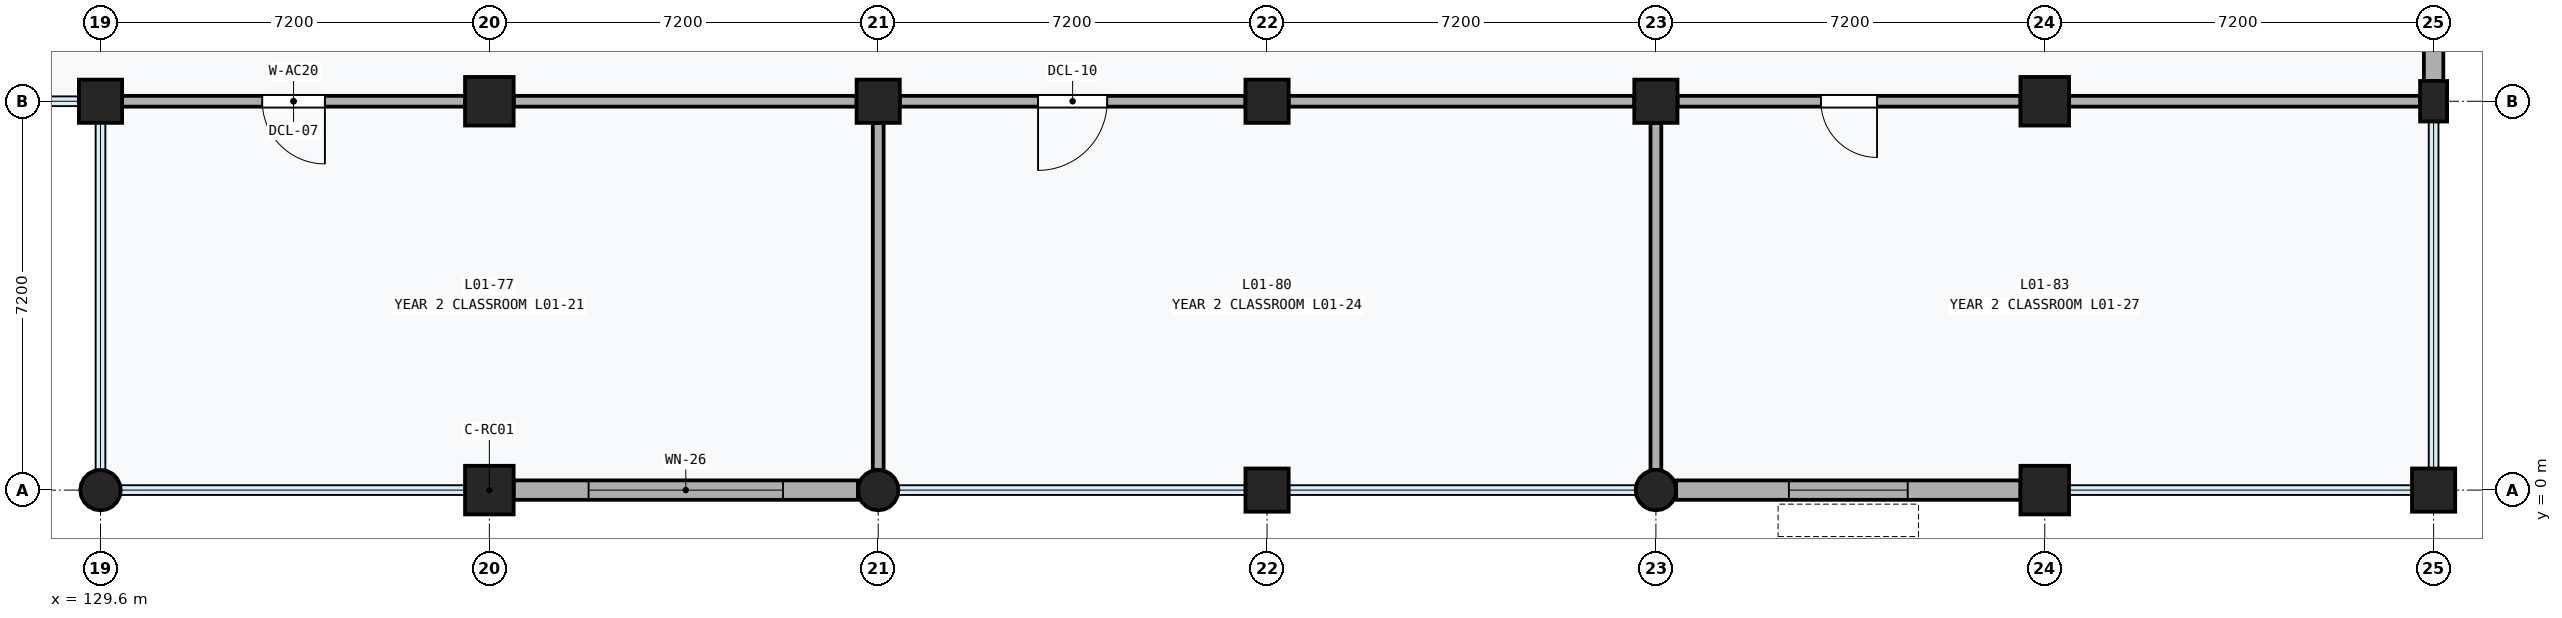
"""IFC4 building model, lengths in metres.
Left out: names, types, materials, properties, quantities, classifications, styles, units other than length and angle.
Written with IfcOpenShell. Run it as: python <this file> out.ifc"""

import sys

from ifc_helpers import new_model, si_unit, direction, frame, frame_2d, origin, origin_2d, place, context, subcontext, project, spatial, rectangle, circle, extrude, element, fill, save


model = new_model("IFC4")
c1 = context("Model", 3, precision=1e-05, world=origin(), true_north=direction((0.0, 1.0)))
c2 = subcontext(c1, "Body", "Model", "MODEL_VIEW")
j1 = project(units=[si_unit("LENGTHUNIT", "METRE"), si_unit("PLANEANGLEUNIT", "RADIAN")], contexts=[c1])
p1 = place(None, origin())
s1 = spatial("IfcSite", under=j1, at=p1, CompositionType="ELEMENT")
p2 = place(p1, origin())
s2 = spatial("IfcBuilding", under=s1, at=p2, CompositionType="ELEMENT")
p3 = place(p2, frame((0.0, 0.0, 4.8)))
s3 = spatial("IfcBuildingStorey", under=s2, at=p3, CompositionType="ELEMENT", Elevation=4.8)
p4 = place(p3, frame((129.6, 0.0, 0.0), z_axis=(0.0, 0.0, 1.0), x_axis=(1.0, 0.0, 0.0)))
e1 = element("IfcColumn", 1, at=p4, inside=s3, PredefinedType="COLUMN", context=c2, shape_type="SweptSolid", body=[
    extrude(circle(Radius=0.375, at=origin_2d()), origin(), (0.0, 0.0, 1.0), 4.8),
])
p5 = place(p3, frame((129.6, 7.2, 0.0), z_axis=(0.0, 0.0, 1.0), x_axis=(1.0, 0.0, 0.0)))
e2 = element("IfcColumn", 2, at=p5, inside=s3, PredefinedType="COLUMN", context=c2, shape_type="SweptSolid", body=[
    extrude(rectangle(XDim=0.8, YDim=0.8, at=origin_2d()), origin(), (0.0, 0.0, 1.0), 4.8),
])
for number, where, z_axis, x_axis in (
    (3, (136.8, 0.0, 0.0), (0.0, 0.0, 1.0), (1.0, 0.0, 0.0)),
    (4, (136.8, 7.2, 0.0), (0.0, 0.0, 1.0), (1.0, 0.0, 0.0)),
):
    element("IfcColumn", number, at=place(p3, frame(where, z_axis=z_axis, x_axis=x_axis)), inside=s3, PredefinedType="COLUMN", context=c2, shape_type="SweptSolid", body=[
        extrude(rectangle(XDim=0.9, YDim=0.9, at=origin_2d()), origin(), (0.0, 0.0, 1.0), 4.8),
    ])
p6 = place(p3, frame((144.0, 0.0, 0.0), z_axis=(0.0, 0.0, 1.0), x_axis=(1.0, 0.0, 0.0)))
e5 = element("IfcColumn", 5, at=p6, inside=s3, PredefinedType="COLUMN", context=c2, shape_type="SweptSolid", body=[
    extrude(circle(Radius=0.375, at=origin_2d()), origin(), (0.0, 0.0, 1.0), 4.8),
])
for number, where, z_axis, x_axis in (
    (6, (144.0, 7.2, 0.0), (0.0, 0.0, 1.0), (1.0, 0.0, 0.0)),
    (7, (151.2, 0.0, 0.0), (0.0, 0.0, 1.0), (1.0, 0.0, 0.0)),
    (8, (151.2, 7.2, 0.0), (0.0, 0.0, 1.0), (1.0, 0.0, 0.0)),
):
    element("IfcColumn", number, at=place(p3, frame(where, z_axis=z_axis, x_axis=x_axis)), inside=s3, PredefinedType="COLUMN", context=c2, shape_type="SweptSolid", body=[
        extrude(rectangle(XDim=0.8, YDim=0.8, at=origin_2d()), origin(), (0.0, 0.0, 1.0), 4.8),
    ])
p7 = place(p3, frame((158.4, 0.0, 0.0), z_axis=(0.0, 0.0, 1.0), x_axis=(1.0, 0.0, 0.0)))
e9 = element("IfcColumn", 9, at=p7, inside=s3, PredefinedType="COLUMN", context=c2, shape_type="SweptSolid", body=[
    extrude(circle(Radius=0.375, at=origin_2d()), origin(), (0.0, 0.0, 1.0), 4.8),
])
p8 = place(p3, frame((158.4, 7.2, 0.0), z_axis=(0.0, 0.0, 1.0), x_axis=(1.0, 0.0, 0.0)))
e10 = element("IfcColumn", 10, at=p8, inside=s3, PredefinedType="COLUMN", context=c2, shape_type="SweptSolid", body=[
    extrude(rectangle(XDim=0.8, YDim=0.8, at=origin_2d()), origin(), (0.0, 0.0, 1.0), 4.8),
])
for number, where, z_axis, x_axis in (
    (11, (165.6, 0.0, 0.0), (0.0, 0.0, 1.0), (1.0, 0.0, 0.0)),
    (12, (165.6, 7.2, 0.0), (0.0, 0.0, 1.0), (1.0, 0.0, 0.0)),
):
    element("IfcColumn", number, at=place(p3, frame(where, z_axis=z_axis, x_axis=x_axis)), inside=s3, PredefinedType="COLUMN", context=c2, shape_type="SweptSolid", body=[
        extrude(rectangle(XDim=0.9, YDim=0.9, at=origin_2d()), origin(), (0.0, 0.0, 1.0), 4.8),
    ])
p9 = place(p3, frame((172.8, 0.0, 0.0), z_axis=(0.0, 0.0, 1.0), x_axis=(1.0, 0.0, 0.0)))
e13 = element("IfcColumn", 13, at=p9, inside=s3, PredefinedType="COLUMN", context=c2, shape_type="SweptSolid", body=[
    extrude(rectangle(XDim=0.8, YDim=0.8, at=origin_2d()), origin(), (0.0, 0.0, 1.0), 4.8),
])
p10 = place(p3, frame((172.8, 7.2, 0.0), z_axis=(0.0, 0.0, 1.0), x_axis=(1.0, 0.0, 0.0)))
e14 = element("IfcColumn", 14, at=p10, inside=s3, PredefinedType="PILASTER", context=c2, shape_type="SweptSolid", body=[
    extrude(rectangle(XDim=0.5, YDim=0.75, at=origin_2d()), origin(), (0.0, 0.0, 1.0), 4.8),
])
p11 = place(p3, frame((137.25, 0.0, 0.0), z_axis=(0.0, 0.0, 1.0), x_axis=(1.0, 0.0, 0.0)))
e15 = element("IfcWall", 15, at=p11, inside=s3, PredefinedType="SOLIDWALL", context=c2, shape_type="SweptSolid", body=[
    extrude(rectangle(XDim=6.375, YDim=0.36, at=frame_2d((3.188, 0.0))), origin(), (0.0, 0.0, 1.0), 3.85),
])
p12 = place(p11, frame((1.387, 0.0, 0.7)))
e16 = element("IfcOpeningElement", 16, at=p12, cuts=e15, PredefinedType="OPENING", context=c2, shape_type="SweptSolid", body=[
    extrude(rectangle(XDim=3.6, YDim=2.2, at=frame_2d((1.8, 1.1))), frame((0.0, 0.192, 0.0), z_axis=(0.0, -1.0, 0.0), x_axis=(1.0, 0.0, 0.0)), (0.0, 0.0, 1.0), 0.384),
])
p13 = place(p3, frame((158.775, 0.0, 0.0), z_axis=(0.0, 0.0, 1.0), x_axis=(1.0, 0.0, 0.0)))
e17 = element("IfcWall", 17, at=p13, inside=s3, PredefinedType="SOLIDWALL", context=c2, shape_type="SweptSolid", body=[
    extrude(rectangle(XDim=6.375, YDim=0.36, at=frame_2d((3.188, 0.0))), origin(), (0.0, 0.0, 1.0), 3.85),
])
p14 = place(p13, frame((2.087, 0.0, 0.9)))
e18 = element("IfcOpeningElement", 18, at=p14, cuts=e17, PredefinedType="OPENING", context=c2, shape_type="SweptSolid", body=[
    extrude(rectangle(XDim=2.2, YDim=1.8, at=frame_2d((1.1, 0.9))), frame((0.0, 0.192, 0.0), z_axis=(0.0, -1.0, 0.0), x_axis=(1.0, 0.0, 0.0)), (0.0, 0.0, 1.0), 0.384),
])
p15 = place(p3, frame((172.8, 7.575, 0.0), z_axis=(0.0, 0.0, 1.0), x_axis=(0.0, 1.0, 0.0)))
e19 = element("IfcWall", 19, at=p15, inside=s3, PredefinedType="SOLIDWALL", context=c2, shape_type="SweptSolid", body=[
    extrude(rectangle(XDim=6.425, YDim=0.36, at=frame_2d((3.212, 0.0))), origin(), (0.0, 0.0, 1.0), 3.85),
])
p16 = place(p15, frame((1.812, 0.0, 0.9)))
e20 = element("IfcOpeningElement", 20, at=p16, cuts=e19, PredefinedType="OPENING", context=c2, shape_type="SweptSolid", body=[
    extrude(rectangle(XDim=2.8, YDim=1.8, at=frame_2d((1.4, 0.9))), frame((0.0, 0.192, 0.0), z_axis=(0.0, -1.0, 0.0), x_axis=(1.0, 0.0, 0.0)), (0.0, 0.0, 1.0), 0.384),
])
p17 = place(p3, frame((130.0, 7.2, 0.0), z_axis=(0.0, 0.0, 1.0), x_axis=(1.0, 0.0, 0.0)))
e21 = element("IfcWall", 21, at=p17, inside=s3, PredefinedType="PARTITIONING", context=c2, shape_type="SweptSolid", body=[
    extrude(rectangle(XDim=6.35, YDim=0.2, at=frame_2d((3.175, 0.0))), origin(), (0.0, 0.0, 1.0), 3.58),
])
p18 = place(p17, frame((2.595, 0.0, 0.0)))
e22 = element("IfcOpeningElement", 22, at=p18, cuts=e21, PredefinedType="OPENING", context=c2, shape_type="SweptSolid", body=[
    extrude(rectangle(XDim=1.16, YDim=2.22, at=frame_2d((0.58, 1.11))), frame((0.0, 0.112, 0.0), z_axis=(0.0, -1.0, 0.0), x_axis=(1.0, 0.0, 0.0)), (0.0, 0.0, 1.0), 0.224),
])
p19 = place(p3, frame((137.25, 7.2, 0.0), z_axis=(0.0, 0.0, 1.0), x_axis=(1.0, 0.0, 0.0)))
e23 = element("IfcWall", 23, at=p19, inside=s3, PredefinedType="PARTITIONING", context=c2, shape_type="SweptSolid", body=[
    extrude(rectangle(XDim=6.35, YDim=0.2, at=frame_2d((3.175, 0.0))), origin(), (0.0, 0.0, 1.0), 3.58),
])
p20 = place(p3, frame((144.0, 0.375, 0.0), z_axis=(0.0, 0.0, 1.0), x_axis=(0.0, 1.0, 0.0)))
e24 = element("IfcWall", 24, at=p20, inside=s3, PredefinedType="PARTITIONING", context=c2, shape_type="SweptSolid", body=[
    extrude(rectangle(XDim=6.425, YDim=0.2, at=frame_2d((3.212, 0.0))), origin(), (0.0, 0.0, 1.0), 3.58),
])
p21 = place(p3, frame((144.4, 7.2, 0.0), z_axis=(0.0, 0.0, 1.0), x_axis=(1.0, 0.0, 0.0)))
e25 = element("IfcWall", 25, at=p21, inside=s3, PredefinedType="PARTITIONING", context=c2, shape_type="SweptSolid", body=[
    extrude(rectangle(XDim=6.4, YDim=0.2, at=frame_2d((3.2, 0.0))), origin(), (0.0, 0.0, 1.0), 3.58),
])
p22 = place(p21, frame((2.56, 0.0, 0.0)))
e26 = element("IfcOpeningElement", 26, at=p22, cuts=e25, PredefinedType="OPENING", context=c2, shape_type="SweptSolid", body=[
    extrude(rectangle(XDim=1.28, YDim=2.28, at=frame_2d((0.64, 1.14))), frame((0.0, 0.112, 0.0), z_axis=(0.0, -1.0, 0.0), x_axis=(1.0, 0.0, 0.0)), (0.0, 0.0, 1.0), 0.224),
])
p23 = place(p3, frame((151.6, 7.2, 0.0), z_axis=(0.0, 0.0, 1.0), x_axis=(1.0, 0.0, 0.0)))
e27 = element("IfcWall", 27, at=p23, inside=s3, PredefinedType="PARTITIONING", context=c2, shape_type="SweptSolid", body=[
    extrude(rectangle(XDim=6.4, YDim=0.2, at=frame_2d((3.2, 0.0))), origin(), (0.0, 0.0, 1.0), 3.58),
])
p24 = place(p3, frame((158.4, 0.375, 0.0), z_axis=(0.0, 0.0, 1.0), x_axis=(0.0, 1.0, 0.0)))
e28 = element("IfcWall", 28, at=p24, inside=s3, PredefinedType="PARTITIONING", context=c2, shape_type="SweptSolid", body=[
    extrude(rectangle(XDim=6.425, YDim=0.2, at=frame_2d((3.212, 0.0))), origin(), (0.0, 0.0, 1.0), 3.58),
])
p25 = place(p3, frame((158.8, 7.2, 0.0), z_axis=(0.0, 0.0, 1.0), x_axis=(1.0, 0.0, 0.0)))
e29 = element("IfcWall", 29, at=p25, inside=s3, PredefinedType="PARTITIONING", context=c2, shape_type="SweptSolid", body=[
    extrude(rectangle(XDim=6.35, YDim=0.2, at=frame_2d((3.175, 0.0))), origin(), (0.0, 0.0, 1.0), 3.58),
])
p26 = place(p25, frame((2.655, 0.0, 0.0)))
e30 = element("IfcOpeningElement", 30, at=p26, cuts=e29, PredefinedType="OPENING", context=c2, shape_type="SweptSolid", body=[
    extrude(rectangle(XDim=1.04, YDim=2.14, at=frame_2d((0.52, 1.07))), frame((0.0, 0.112, 0.0), z_axis=(0.0, -1.0, 0.0), x_axis=(1.0, 0.0, 0.0)), (0.0, 0.0, 1.0), 0.224),
])
p27 = place(p3, frame((166.05, 7.2, 0.0), z_axis=(0.0, 0.0, 1.0), x_axis=(1.0, 0.0, 0.0)))
e31 = element("IfcWall", 31, at=p27, inside=s3, PredefinedType="PARTITIONING", context=c2, shape_type="SweptSolid", body=[
    extrude(rectangle(XDim=6.5, YDim=0.2, at=frame_2d((3.25, 0.0))), origin(), (0.0, 0.0, 1.0), 3.58),
])
p28 = place(p12, origin())
e32 = element("IfcWindow", 32, at=p28, inside=s3, PartitioningType="SINGLE_PANEL", PredefinedType="WINDOW", context=c2, shape_type="SweptSolid", body=[
    extrude(rectangle(XDim=3.6, YDim=2.2, at=frame_2d((1.8, 1.1))), frame((0.0, 0.03, 0.0), z_axis=(0.0, -1.0, 0.0), x_axis=(1.0, 0.0, 0.0)), (0.0, 0.0, 1.0), 0.06),
])
fill(e16, e32)
p29 = place(p14, origin())
e33 = element("IfcWindow", 33, at=p29, inside=s3, PartitioningType="SINGLE_PANEL", PredefinedType="WINDOW", context=c2, shape_type="SweptSolid", body=[
    extrude(rectangle(XDim=2.2, YDim=1.8, at=frame_2d((1.1, 0.9))), frame((0.0, 0.03, 0.0), z_axis=(0.0, -1.0, 0.0), x_axis=(1.0, 0.0, 0.0)), (0.0, 0.0, 1.0), 0.06),
])
fill(e18, e33)
p30 = place(p18, frame((1.16, 0.0, 0.0), z_axis=(0.0, 0.0, 1.0), x_axis=(-1.0, 0.0, 0.0)))
e34 = element("IfcDoor", 34, at=p30, inside=s3, OperationType="SINGLE_SWING_LEFT", PredefinedType="DOOR", context=c2, shape_type="SweptSolid", body=[
    extrude(rectangle(XDim=1.16, YDim=2.22, at=frame_2d((0.58, 1.11))), frame((0.0, 0.025, 0.0), z_axis=(0.0, -1.0, 0.0), x_axis=(1.0, 0.0, 0.0)), (0.0, 0.0, 1.0), 0.05),
])
fill(e22, e34)
p31 = place(p22, frame((1.28, 0.0, 0.0), z_axis=(0.0, 0.0, 1.0), x_axis=(-1.0, 0.0, 0.0)))
e35 = element("IfcDoor", 35, at=p31, inside=s3, OperationType="SINGLE_SWING_RIGHT", PredefinedType="DOOR", context=c2, shape_type="SweptSolid", body=[
    extrude(rectangle(XDim=1.28, YDim=2.28, at=frame_2d((0.64, 1.14))), frame((0.0, 0.025, 0.0), z_axis=(0.0, -1.0, 0.0), x_axis=(1.0, 0.0, 0.0)), (0.0, 0.0, 1.0), 0.05),
])
fill(e26, e35)
p32 = place(p26, frame((1.04, 0.0, 0.0), z_axis=(0.0, 0.0, 1.0), x_axis=(-1.0, 0.0, 0.0)))
e36 = element("IfcDoor", 36, at=p32, inside=s3, OperationType="SINGLE_SWING_LEFT", PredefinedType="DOOR", context=c2, shape_type="SweptSolid", body=[
    extrude(rectangle(XDim=1.04, YDim=2.14, at=frame_2d((0.52, 1.07))), frame((0.0, 0.025, 0.0), z_axis=(0.0, -1.0, 0.0), x_axis=(1.0, 0.0, 0.0)), (0.0, 0.0, 1.0), 0.05),
])
fill(e30, e36)
save(model, sys.argv[1])
